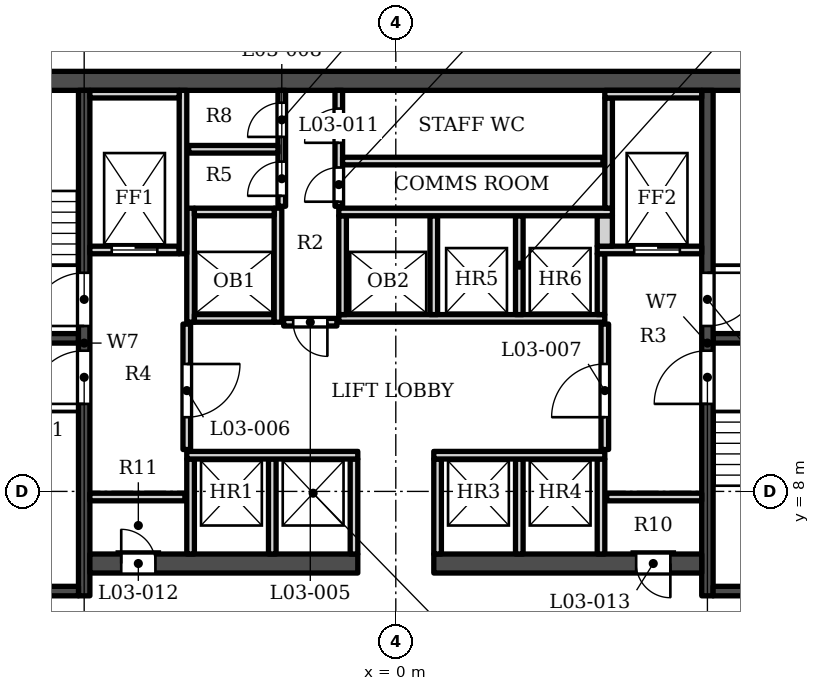
"""IFC4 building model, lengths in metres.
Left out: names, types, materials, properties, quantities, classifications, styles, units other than length and angle.
Written with IfcOpenShell. Run it as: python <this file> out.ifc"""

import sys

from ifc_helpers import new_model, si_unit, direction, frame, frame_2d, origin, place, context, subcontext, project, spatial, rectangle, extrude, element, fill, save


model = new_model("IFC4")
c1 = context("Model", 3, precision=1e-05, world=origin(), true_north=direction((0.0, 1.0)))
c2 = subcontext(c1, "Body", "Model", "MODEL_VIEW")
j1 = project(units=[si_unit("LENGTHUNIT", "METRE"), si_unit("PLANEANGLEUNIT", "RADIAN")], contexts=[c1])
p1 = place(None, origin())
s1 = spatial("IfcSite", under=j1, at=p1, CompositionType="ELEMENT")
p2 = place(p1, origin())
s2 = spatial("IfcBuilding", under=s1, at=p2, CompositionType="ELEMENT")
p3 = place(p2, frame((0.0, 0.0, 29.0)))
s3 = spatial("IfcBuildingStorey", under=s2, at=p3, CompositionType="ELEMENT", Elevation=29.0)
p4 = place(p3, frame((-16.9, 18.802, 0.0), z_axis=(0.0, 0.0, 1.0), x_axis=(1.0, 0.0, 0.0)))
e1 = element("IfcWall", 1, at=p4, inside=s3, PredefinedType="SHEAR", context=c2, shape_type="SweptSolid", body=[
    extrude(rectangle(XDim=33.8, YDim=0.5, at=frame_2d((16.9, 0.0))), origin(), (0.0, 0.0, 1.0), 5.5),
])
p5 = place(p3, frame((-8.2, 5.253, 0.0), z_axis=(0.0, 0.0, 1.0), x_axis=(0.0, 1.0, 0.0)))
e2 = element("IfcWall", 2, at=p5, inside=s3, PredefinedType="SHEAR", context=c2, shape_type="SweptSolid", body=[
    extrude(rectangle(XDim=13.3, YDim=0.3, at=frame_2d((6.65, 0.0))), origin(), (0.0, 0.0, 1.0), 5.5),
])
p6 = place(p5, frame((7.1, 0.0, 0.0)))
e3 = element("IfcOpeningElement", 3, at=p6, cuts=e2, PredefinedType="OPENING", context=c2, shape_type="SweptSolid", body=[
    extrude(rectangle(XDim=1.4, YDim=2.1, at=frame_2d((0.7, 1.05))), frame((0.0, 0.16, 0.0), z_axis=(0.0, -1.0, 0.0), x_axis=(1.0, 0.0, 0.0)), (0.0, 0.0, 1.0), 0.32),
])
p7 = place(p5, frame((5.05, 0.0, 0.0)))
e4 = element("IfcOpeningElement", 4, at=p7, cuts=e2, PredefinedType="OPENING", context=c2, shape_type="SweptSolid", body=[
    extrude(rectangle(XDim=1.4, YDim=2.1, at=frame_2d((0.7, 1.05))), frame((0.0, 0.16, 0.0), z_axis=(0.0, -1.0, 0.0), x_axis=(1.0, 0.0, 0.0)), (0.0, 0.0, 1.0), 0.32),
])
for number, where, z_axis, x_axis in (
    (5, (-12.1, 12.028, 0.0), (0.0, 0.0, 1.0), (1.0, 0.0, 0.0)),
    (6, (-12.1, 5.378, 0.0), (0.0, 0.0, 1.0), (1.0, 0.0, 0.0)),
):
    element("IfcWall", number, at=place(p3, frame(where, z_axis=z_axis, x_axis=x_axis)), inside=s3, PredefinedType="SHEAR", context=c2, shape_type="SweptSolid", body=[
        extrude(rectangle(XDim=3.75, YDim=0.25, at=frame_2d((1.875, 0.0))), origin(), (0.0, 0.0, 1.0), 5.5),
    ])
p8 = place(p3, frame((8.2, 5.253, 0.0), z_axis=(0.0, 0.0, 1.0), x_axis=(0.0, 1.0, 0.0)))
e7 = element("IfcWall", 7, at=p8, inside=s3, PredefinedType="SHEAR", context=c2, shape_type="SweptSolid", body=[
    extrude(rectangle(XDim=13.3, YDim=0.3, at=frame_2d((6.65, 0.0))), origin(), (0.0, 0.0, 1.0), 5.5),
])
p9 = place(p8, frame((7.1, 0.0, 0.0)))
e8 = element("IfcOpeningElement", 8, at=p9, cuts=e7, PredefinedType="OPENING", context=c2, shape_type="SweptSolid", body=[
    extrude(rectangle(XDim=1.4, YDim=2.1, at=frame_2d((0.7, 1.05))), frame((0.0, 0.16, 0.0), z_axis=(0.0, -1.0, 0.0), x_axis=(1.0, 0.0, 0.0)), (0.0, 0.0, 1.0), 0.32),
])
p10 = place(p8, frame((5.05, 0.0, 0.0)))
e9 = element("IfcOpeningElement", 9, at=p10, cuts=e7, PredefinedType="OPENING", context=c2, shape_type="SweptSolid", body=[
    extrude(rectangle(XDim=1.4, YDim=2.1, at=frame_2d((0.7, 1.05))), frame((0.0, 0.16, 0.0), z_axis=(0.0, -1.0, 0.0), x_axis=(1.0, 0.0, 0.0)), (0.0, 0.0, 1.0), 0.32),
])
for number, where, z_axis, x_axis in (
    (10, (8.35, 12.028, 0.0), (0.0, 0.0, 1.0), (1.0, 0.0, 0.0)),
    (11, (8.35, 5.378, 0.0), (0.0, 0.0, 1.0), (1.0, 0.0, 0.0)),
):
    element("IfcWall", number, at=place(p3, frame(where, z_axis=z_axis, x_axis=x_axis)), inside=s3, PredefinedType="SHEAR", context=c2, shape_type="SweptSolid", body=[
        extrude(rectangle(XDim=3.75, YDim=0.25, at=frame_2d((1.875, 0.0))), origin(), (0.0, 0.0, 1.0), 5.5),
    ])
p11 = place(p3, frame((-8.05, 6.103, 0.0), z_axis=(0.0, 0.0, 1.0), x_axis=(1.0, 0.0, 0.0)))
e12 = element("IfcWall", 12, at=p11, inside=s3, PredefinedType="SHEAR", context=c2, shape_type="SweptSolid", body=[
    extrude(rectangle(XDim=7.05, YDim=0.5, at=frame_2d((3.525, 0.0))), origin(), (0.0, 0.0, 1.0), 5.5),
])
p12 = place(p11, frame((0.825, 0.0, 0.0)))
e13 = element("IfcOpeningElement", 13, at=p12, cuts=e12, PredefinedType="OPENING", context=c2, shape_type="SweptSolid", body=[
    extrude(rectangle(XDim=0.9, YDim=2.1, at=frame_2d((0.45, 1.05))), frame((0.0, 0.26, 0.0), z_axis=(0.0, -1.0, 0.0), x_axis=(1.0, 0.0, 0.0)), (0.0, 0.0, 1.0), 0.52),
])
p13 = place(p3, frame((1.0, 6.103, 0.0), z_axis=(0.0, 0.0, 1.0), x_axis=(1.0, 0.0, 0.0)))
e14 = element("IfcWall", 14, at=p13, inside=s3, PredefinedType="SHEAR", context=c2, shape_type="SweptSolid", body=[
    extrude(rectangle(XDim=7.05, YDim=0.5, at=frame_2d((3.525, 0.0))), origin(), (0.0, 0.0, 1.0), 5.5),
])
p14 = place(p13, frame((5.325, 0.0, 0.0)))
e15 = element("IfcOpeningElement", 15, at=p14, cuts=e14, PredefinedType="OPENING", context=c2, shape_type="SweptSolid", body=[
    extrude(rectangle(XDim=0.9, YDim=2.1, at=frame_2d((0.45, 1.05))), frame((0.0, 0.26, 0.0), z_axis=(0.0, -1.0, 0.0), x_axis=(1.0, 0.0, 0.0)), (0.0, 0.0, 1.0), 0.52),
])
for number, where, z_axis, x_axis in (
    (16, (-5.4, 6.353, 0.0), (0.0, 0.0, 1.0), (0.0, 1.0, 0.0)),
    (17, (-3.25, 6.353, 0.0), (0.0, 0.0, 1.0), (0.0, 1.0, 0.0)),
    (18, (-1.1, 6.353, 0.0), (0.0, 0.0, 1.0), (0.0, 1.0, 0.0)),
    (19, (1.1, 6.353, 0.0), (0.0, 0.0, 1.0), (0.0, 1.0, 0.0)),
    (20, (3.25, 6.353, 0.0), (0.0, 0.0, 1.0), (0.0, 1.0, 0.0)),
    (21, (5.4, 6.353, 0.0), (0.0, 0.0, 1.0), (0.0, 1.0, 0.0)),
    (22, (-8.05, 7.853, 0.0), (0.0, 0.0, 1.0), (1.0, 0.0, 0.0)),
    (23, (5.55, 7.853, 0.0), (0.0, 0.0, 1.0), (1.0, 0.0, 0.0)),
):
    element("IfcWall", number, at=place(p3, frame(where, z_axis=z_axis, x_axis=x_axis)), inside=s3, PredefinedType="SOLIDWALL", context=c2, shape_type="SweptSolid", body=[
        extrude(rectangle(XDim=2.5, YDim=0.2, at=frame_2d((1.25, 0.0))), origin(), (0.0, 0.0, 1.0), 5.05),
    ])
for number, where, z_axis, x_axis in (
    (24, (-5.5, 8.953, 0.0), (0.0, 0.0, 1.0), (1.0, 0.0, 0.0)),
    (25, (1.0, 8.953, 0.0), (0.0, 0.0, 1.0), (1.0, 0.0, 0.0)),
):
    element("IfcWall", number, at=place(p3, frame(where, z_axis=z_axis, x_axis=x_axis)), inside=s3, PredefinedType="SOLIDWALL", context=c2, shape_type="SweptSolid", body=[
        extrude(rectangle(XDim=4.5, YDim=0.2, at=frame_2d((2.25, 0.0))), origin(), (0.0, 0.0, 1.0), 5.05),
    ])
p15 = place(p3, frame((-5.5, 9.103, 0.0), z_axis=(0.0, 0.0, 1.0), x_axis=(0.0, 1.0, 0.0)))
e26 = element("IfcWall", 26, at=p15, inside=s3, PredefinedType="SOLIDWALL", context=c2, shape_type="SweptSolid", body=[
    extrude(rectangle(XDim=3.3, YDim=0.2, at=frame_2d((1.65, 0.0))), origin(), (0.0, 0.0, 1.0), 5.05),
])
p16 = place(p15, frame((0.85, 0.0, 0.0)))
e27 = element("IfcOpeningElement", 27, at=p16, cuts=e26, PredefinedType="OPENING", context=c2, shape_type="SweptSolid", body=[
    extrude(rectangle(XDim=1.4, YDim=2.1, at=frame_2d((0.7, 1.05))), frame((0.0, 0.11, 0.0), z_axis=(0.0, -1.0, 0.0), x_axis=(1.0, 0.0, 0.0)), (0.0, 0.0, 1.0), 0.22),
])
p17 = place(p3, frame((5.5, 9.103, 0.0), z_axis=(0.0, 0.0, 1.0), x_axis=(0.0, 1.0, 0.0)))
e28 = element("IfcWall", 28, at=p17, inside=s3, PredefinedType="SOLIDWALL", context=c2, shape_type="SweptSolid", body=[
    extrude(rectangle(XDim=3.3, YDim=0.2, at=frame_2d((1.65, 0.0))), origin(), (0.0, 0.0, 1.0), 5.05),
])
p18 = place(p17, frame((0.85, 0.0, 0.0)))
e29 = element("IfcOpeningElement", 29, at=p18, cuts=e28, PredefinedType="OPENING", context=c2, shape_type="SweptSolid", body=[
    extrude(rectangle(XDim=1.4, YDim=2.1, at=frame_2d((0.7, 1.05))), frame((0.0, 0.11, 0.0), z_axis=(0.0, -1.0, 0.0), x_axis=(1.0, 0.0, 0.0)), (0.0, 0.0, 1.0), 0.22),
])
p19 = place(p3, frame((-2.95, 12.453, 0.0), z_axis=(0.0, 0.0, 1.0), x_axis=(1.0, 0.0, 0.0)))
e30 = element("IfcWall", 30, at=p19, inside=s3, PredefinedType="SOLIDWALL", context=c2, shape_type="SweptSolid", body=[
    extrude(rectangle(XDim=1.4, YDim=0.2, at=frame_2d((0.7, 0.0))), origin(), (0.0, 0.0, 1.0), 5.05),
])
p20 = place(p19, frame((0.25, 0.0, 0.0)))
e31 = element("IfcOpeningElement", 31, at=p20, cuts=e30, PredefinedType="OPENING", context=c2, shape_type="SweptSolid", body=[
    extrude(rectangle(XDim=0.9, YDim=2.1, at=frame_2d((0.45, 1.05))), frame((0.0, 0.11, 0.0), z_axis=(0.0, -1.0, 0.0), x_axis=(1.0, 0.0, 0.0)), (0.0, 0.0, 1.0), 0.22),
])
p21 = place(p3, frame((-5.4, 12.453, 0.0), z_axis=(0.0, 0.0, 1.0), x_axis=(0.0, 1.0, 0.0)))
e32 = element("IfcWall", 32, at=p21, inside=s3, PredefinedType="SOLIDWALL", context=c2, shape_type="SweptSolid", body=[
    extrude(rectangle(XDim=3.0, YDim=0.2, at=frame_2d((1.5, 0.0))), origin(), (0.0, 0.0, 1.0), 5.05),
])
p22 = place(p3, frame((-5.3, 12.552, 0.0), z_axis=(0.0, 0.0, 1.0), x_axis=(1.0, 0.0, 0.0)))
e33 = element("IfcWall", 33, at=p22, inside=s3, PredefinedType="SOLIDWALL", context=c2, shape_type="SweptSolid", body=[
    extrude(rectangle(XDim=2.1, YDim=0.2, at=frame_2d((1.05, 0.0))), origin(), (0.0, 0.0, 1.0), 5.05),
])
p23 = place(p3, frame((-3.1, 12.453, 0.0), z_axis=(0.0, 0.0, 1.0), x_axis=(0.0, 1.0, 0.0)))
e34 = element("IfcWall", 34, at=p23, inside=s3, PredefinedType="SOLIDWALL", context=c2, shape_type="SweptSolid", body=[
    extrude(rectangle(XDim=3.0, YDim=0.2, at=frame_2d((1.5, 0.0))), origin(), (0.0, 0.0, 1.0), 5.05),
])
p24 = place(p3, frame((-1.5, 12.552, 0.0), z_axis=(0.0, 0.0, 1.0), x_axis=(1.0, 0.0, 0.0)))
e35 = element("IfcWall", 35, at=p24, inside=s3, PredefinedType="SOLIDWALL", context=c2, shape_type="SweptSolid", body=[
    extrude(rectangle(XDim=7.0, YDim=0.2, at=frame_2d((3.5, 0.0))), origin(), (0.0, 0.0, 1.0), 5.05),
])
for number, where, z_axis, x_axis in (
    (36, (-1.4, 12.653, 0.0), (0.0, 0.0, 1.0), (0.0, 1.0, 0.0)),
    (37, (1.0, 12.653, 0.0), (0.0, 0.0, 1.0), (0.0, 1.0, 0.0)),
    (38, (3.25, 12.653, 0.0), (0.0, 0.0, 1.0), (0.0, 1.0, 0.0)),
):
    element("IfcWall", number, at=place(p3, frame(where, z_axis=z_axis, x_axis=x_axis)), inside=s3, PredefinedType="SOLIDWALL", context=c2, shape_type="SweptSolid", body=[
        extrude(rectangle(XDim=2.6, YDim=0.2, at=frame_2d((1.3, 0.0))), origin(), (0.0, 0.0, 1.0), 5.05),
    ])
p25 = place(p3, frame((5.4, 12.653, 0.0), z_axis=(0.0, 0.0, 1.0), x_axis=(0.0, 1.0, 0.0)))
e39 = element("IfcWall", 39, at=p25, inside=s3, PredefinedType="SOLIDWALL", context=c2, shape_type="SweptSolid", body=[
    extrude(rectangle(XDim=1.6, YDim=0.2, at=frame_2d((0.8, 0.0))), origin(), (0.0, 0.0, 1.0), 5.05),
])
p26 = place(p3, frame((-8.05, 14.353, 0.0), z_axis=(0.0, 0.0, 1.0), x_axis=(1.0, 0.0, 0.0)))
e40 = element("IfcWall", 40, at=p26, inside=s3, PredefinedType="SOLIDWALL", context=c2, shape_type="SweptSolid", body=[
    extrude(rectangle(XDim=2.35, YDim=0.2, at=frame_2d((1.175, 0.0))), origin(), (0.0, 0.0, 1.0), 5.05),
])
p27 = place(p26, frame((0.575, 0.0, 0.0)))
e41 = element("IfcOpeningElement", 41, at=p27, cuts=e40, PredefinedType="OPENING", context=c2, shape_type="SweptSolid", body=[
    extrude(rectangle(XDim=1.2, YDim=2.1, at=frame_2d((0.6, 1.05))), frame((0.0, 0.11, 0.0), z_axis=(0.0, -1.0, 0.0), x_axis=(1.0, 0.0, 0.0)), (0.0, 0.0, 1.0), 0.22),
])
p28 = place(p3, frame((-5.6, 14.253, 0.0), z_axis=(0.0, 0.0, 1.0), x_axis=(0.0, 1.0, 0.0)))
e42 = element("IfcWall", 42, at=p28, inside=s3, PredefinedType="SOLIDWALL", context=c2, shape_type="SweptSolid", body=[
    extrude(rectangle(XDim=4.3, YDim=0.2, at=frame_2d((2.15, 0.0))), origin(), (0.0, 0.0, 1.0), 5.05),
])
p29 = place(p3, frame((5.3, 14.353, 0.0), z_axis=(0.0, 0.0, 1.0), x_axis=(1.0, 0.0, 0.0)))
e43 = element("IfcWall", 43, at=p29, inside=s3, PredefinedType="SOLIDWALL", context=c2, shape_type="SweptSolid", body=[
    extrude(rectangle(XDim=2.75, YDim=0.2, at=frame_2d((1.375, 0.0))), origin(), (0.0, 0.0, 1.0), 5.05),
])
p30 = place(p29, frame((0.975, 0.0, 0.0)))
e44 = element("IfcOpeningElement", 44, at=p30, cuts=e43, PredefinedType="OPENING", context=c2, shape_type="SweptSolid", body=[
    extrude(rectangle(XDim=1.2, YDim=2.1, at=frame_2d((0.6, 1.05))), frame((0.0, 0.11, 0.0), z_axis=(0.0, -1.0, 0.0), x_axis=(1.0, 0.0, 0.0)), (0.0, 0.0, 1.0), 0.22),
])
p31 = place(p3, frame((5.5, 14.453, 0.0), z_axis=(0.0, 0.0, 1.0), x_axis=(0.0, 1.0, 0.0)))
e45 = element("IfcWall", 45, at=p31, inside=s3, PredefinedType="SOLIDWALL", context=c2, shape_type="SweptSolid", body=[
    extrude(rectangle(XDim=0.8, YDim=0.4, at=frame_2d((0.4, 0.0))), origin(), (0.0, 0.0, 1.0), 5.05),
])
p32 = place(p3, frame((-5.3, 15.353, 0.0), z_axis=(0.0, 0.0, 1.0), x_axis=(1.0, 0.0, 0.0)))
e46 = element("IfcWall", 46, at=p32, inside=s3, PredefinedType="SOLIDWALL", context=c2, shape_type="SweptSolid", body=[
    extrude(rectangle(XDim=2.1, YDim=0.2, at=frame_2d((1.05, 0.0))), origin(), (0.0, 0.0, 1.0), 5.05),
])
p33 = place(p3, frame((-1.5, 15.353, 0.0), z_axis=(0.0, 0.0, 1.0), x_axis=(1.0, 0.0, 0.0)))
e47 = element("IfcWall", 47, at=p33, inside=s3, PredefinedType="SOLIDWALL", context=c2, shape_type="SweptSolid", body=[
    extrude(rectangle(XDim=7.2, YDim=0.2, at=frame_2d((3.6, 0.0))), origin(), (0.0, 0.0, 1.0), 5.05),
])
p34 = place(p3, frame((5.6, 15.453, 0.0), z_axis=(0.0, 0.0, 1.0), x_axis=(0.0, 1.0, 0.0)))
e48 = element("IfcWall", 48, at=p34, inside=s3, PredefinedType="SOLIDWALL", context=c2, shape_type="SweptSolid", body=[
    extrude(rectangle(XDim=2.9, YDim=0.2, at=frame_2d((1.45, 0.0))), origin(), (0.0, 0.0, 1.0), 5.05),
])
p35 = place(p3, frame((-3.0, 15.503, 0.0), z_axis=(0.0, 0.0, 1.0), x_axis=(0.0, 1.0, 0.0)))
e49 = element("IfcWall", 49, at=p35, inside=s3, PredefinedType="SOLIDWALL", context=c2, shape_type="SweptSolid", body=[
    extrude(rectangle(XDim=3.05, YDim=0.2, at=frame_2d((1.525, 0.0))), origin(), (0.0, 0.0, 1.0), 5.05),
])
p36 = place(p35, frame((0.275, 0.0, 0.0)))
e50 = element("IfcOpeningElement", 50, at=p36, cuts=e49, PredefinedType="OPENING", context=c2, shape_type="SweptSolid", body=[
    extrude(rectangle(XDim=0.9, YDim=2.1, at=frame_2d((0.45, 1.05))), frame((0.0, 0.11, 0.0), z_axis=(0.0, -1.0, 0.0), x_axis=(1.0, 0.0, 0.0)), (0.0, 0.0, 1.0), 0.22),
])
p37 = place(p35, frame((1.825, 0.0, 0.0)))
e51 = element("IfcOpeningElement", 51, at=p37, cuts=e49, PredefinedType="OPENING", context=c2, shape_type="SweptSolid", body=[
    extrude(rectangle(XDim=0.9, YDim=2.1, at=frame_2d((0.45, 1.05))), frame((0.0, 0.11, 0.0), z_axis=(0.0, -1.0, 0.0), x_axis=(1.0, 0.0, 0.0)), (0.0, 0.0, 1.0), 0.22),
])
p38 = place(p3, frame((-1.5, 15.503, 0.0), z_axis=(0.0, 0.0, 1.0), x_axis=(0.0, 1.0, 0.0)))
e52 = element("IfcWall", 52, at=p38, inside=s3, PredefinedType="SOLIDWALL", context=c2, shape_type="SweptSolid", body=[
    extrude(rectangle(XDim=3.05, YDim=0.2, at=frame_2d((1.525, 0.0))), origin(), (0.0, 0.0, 1.0), 5.05),
])
p39 = place(p38, frame((0.12, 0.0, 0.0)))
e53 = element("IfcOpeningElement", 53, at=p39, cuts=e52, PredefinedType="OPENING", context=c2, shape_type="SweptSolid", body=[
    extrude(rectangle(XDim=0.9, YDim=2.1, at=frame_2d((0.45, 1.05))), frame((0.0, 0.11, 0.0), z_axis=(0.0, -1.0, 0.0), x_axis=(1.0, 0.0, 0.0)), (0.0, 0.0, 1.0), 0.22),
])
p40 = place(p38, frame((1.67, 0.0, 0.0)))
e54 = element("IfcOpeningElement", 54, at=p40, cuts=e52, PredefinedType="OPENING", context=c2, shape_type="SweptSolid", body=[
    extrude(rectangle(XDim=0.9, YDim=2.1, at=frame_2d((0.45, 1.05))), frame((0.0, 0.11, 0.0), z_axis=(0.0, -1.0, 0.0), x_axis=(1.0, 0.0, 0.0)), (0.0, 0.0, 1.0), 0.22),
])
p41 = place(p3, frame((-1.4, 16.693, 0.0), z_axis=(0.0, 0.0, 1.0), x_axis=(1.0, 0.0, 0.0)))
e55 = element("IfcWall", 55, at=p41, inside=s3, PredefinedType="SOLIDWALL", context=c2, shape_type="SweptSolid", body=[
    extrude(rectangle(XDim=6.85, YDim=0.2, at=frame_2d((3.425, 0.0))), origin(), (0.0, 0.0, 1.0), 5.05),
])
p42 = place(p3, frame((-5.45, 17.003, 0.0), z_axis=(0.0, 0.0, 1.0), x_axis=(1.0, 0.0, 0.0)))
e56 = element("IfcWall", 56, at=p42, inside=s3, PredefinedType="SOLIDWALL", context=c2, shape_type="SweptSolid", body=[
    extrude(rectangle(XDim=2.35, YDim=0.2, at=frame_2d((1.175, 0.0))), origin(), (0.0, 0.0, 1.0), 5.05),
])
p43 = place(p3, frame((-8.05, 18.453, 0.0), z_axis=(0.0, 0.0, 1.0), x_axis=(1.0, 0.0, 0.0)))
e57 = element("IfcWall", 57, at=p43, inside=s3, PredefinedType="SOLIDWALL", context=c2, shape_type="SweptSolid", body=[
    extrude(rectangle(XDim=2.35, YDim=0.2, at=frame_2d((1.175, 0.0))), origin(), (0.0, 0.0, 1.0), 5.05),
])
p44 = place(p3, frame((5.5, 18.453, 0.0), z_axis=(0.0, 0.0, 1.0), x_axis=(1.0, 0.0, 0.0)))
e58 = element("IfcWall", 58, at=p44, inside=s3, PredefinedType="SOLIDWALL", context=c2, shape_type="SweptSolid", body=[
    extrude(rectangle(XDim=2.55, YDim=0.2, at=frame_2d((1.275, 0.0))), origin(), (0.0, 0.0, 1.0), 5.05),
])
p45 = place(p27, origin())
e59 = element("IfcDoor", 59, at=p45, inside=s3, OperationType="DOUBLE_DOOR_SLIDING", PredefinedType="DOOR", context=c2, shape_type="SweptSolid", body=[
    extrude(rectangle(XDim=1.2, YDim=2.1, at=frame_2d((0.6, 1.05))), frame((0.0, 0.025, 0.0), z_axis=(0.0, -1.0, 0.0), x_axis=(1.0, 0.0, 0.0)), (0.0, 0.0, 1.0), 0.05),
])
fill(e41, e59)
p46 = place(p30, origin())
e60 = element("IfcDoor", 60, at=p46, inside=s3, OperationType="DOUBLE_DOOR_SLIDING", PredefinedType="DOOR", context=c2, shape_type="SweptSolid", body=[
    extrude(rectangle(XDim=1.2, YDim=2.1, at=frame_2d((0.6, 1.05))), frame((0.0, 0.025, 0.0), z_axis=(0.0, -1.0, 0.0), x_axis=(1.0, 0.0, 0.0)), (0.0, 0.0, 1.0), 0.05),
])
fill(e44, e60)
p47 = place(p6, origin())
e61 = element("IfcDoor", 61, at=p47, inside=s3, OperationType="SINGLE_SWING_LEFT", PredefinedType="DOOR", context=c2, shape_type="SweptSolid", body=[
    extrude(rectangle(XDim=1.4, YDim=2.1, at=frame_2d((0.7, 1.05))), frame((0.0, 0.025, 0.0), z_axis=(0.0, -1.0, 0.0), x_axis=(1.0, 0.0, 0.0)), (0.0, 0.0, 1.0), 0.05),
])
fill(e3, e61)
p48 = place(p7, origin())
e62 = element("IfcDoor", 62, at=p48, inside=s3, OperationType="SINGLE_SWING_LEFT", PredefinedType="DOOR", context=c2, shape_type="SweptSolid", body=[
    extrude(rectangle(XDim=1.4, YDim=2.1, at=frame_2d((0.7, 1.05))), frame((0.0, 0.025, 0.0), z_axis=(0.0, -1.0, 0.0), x_axis=(1.0, 0.0, 0.0)), (0.0, 0.0, 1.0), 0.05),
])
fill(e4, e62)
p49 = place(p9, origin())
e63 = element("IfcDoor", 63, at=p49, inside=s3, OperationType="SINGLE_SWING_RIGHT", PredefinedType="DOOR", context=c2, shape_type="SweptSolid", body=[
    extrude(rectangle(XDim=1.4, YDim=2.1, at=frame_2d((0.7, 1.05))), frame((0.0, 0.025, 0.0), z_axis=(0.0, -1.0, 0.0), x_axis=(1.0, 0.0, 0.0)), (0.0, 0.0, 1.0), 0.05),
])
fill(e8, e63)
p50 = place(p10, origin())
e64 = element("IfcDoor", 64, at=p50, inside=s3, OperationType="SINGLE_SWING_LEFT", PredefinedType="DOOR", context=c2, shape_type="SweptSolid", body=[
    extrude(rectangle(XDim=1.4, YDim=2.1, at=frame_2d((0.7, 1.05))), frame((0.0, 0.025, 0.0), z_axis=(0.0, -1.0, 0.0), x_axis=(1.0, 0.0, 0.0)), (0.0, 0.0, 1.0), 0.05),
])
fill(e9, e64)
p51 = place(p20, origin())
e65 = element("IfcDoor", 65, at=p51, inside=s3, OperationType="SINGLE_SWING_RIGHT", PredefinedType="DOOR", context=c2, shape_type="SweptSolid", body=[
    extrude(rectangle(XDim=0.9, YDim=2.1, at=frame_2d((0.45, 1.05))), frame((0.0, 0.025, 0.0), z_axis=(0.0, -1.0, 0.0), x_axis=(1.0, 0.0, 0.0)), (0.0, 0.0, 1.0), 0.05),
])
fill(e31, e65)
p52 = place(p16, origin())
e66 = element("IfcDoor", 66, at=p52, inside=s3, OperationType="SINGLE_SWING_RIGHT", PredefinedType="DOOR", context=c2, shape_type="SweptSolid", body=[
    extrude(rectangle(XDim=1.4, YDim=2.1, at=frame_2d((0.7, 1.05))), frame((0.0, 0.025, 0.0), z_axis=(0.0, -1.0, 0.0), x_axis=(1.0, 0.0, 0.0)), (0.0, 0.0, 1.0), 0.05),
])
fill(e27, e66)
p53 = place(p18, origin())
e67 = element("IfcDoor", 67, at=p53, inside=s3, OperationType="SINGLE_SWING_LEFT", PredefinedType="DOOR", context=c2, shape_type="SweptSolid", body=[
    extrude(rectangle(XDim=1.4, YDim=2.1, at=frame_2d((0.7, 1.05))), frame((0.0, 0.025, 0.0), z_axis=(0.0, -1.0, 0.0), x_axis=(1.0, 0.0, 0.0)), (0.0, 0.0, 1.0), 0.05),
])
fill(e29, e67)
p54 = place(p36, origin())
e68 = element("IfcDoor", 68, at=p54, inside=s3, OperationType="SINGLE_SWING_LEFT", PredefinedType="DOOR", context=c2, shape_type="SweptSolid", body=[
    extrude(rectangle(XDim=0.9, YDim=2.1, at=frame_2d((0.45, 1.05))), frame((0.0, 0.025, 0.0), z_axis=(0.0, -1.0, 0.0), x_axis=(1.0, 0.0, 0.0)), (0.0, 0.0, 1.0), 0.05),
])
fill(e50, e68)
p55 = place(p37, origin())
e69 = element("IfcDoor", 69, at=p55, inside=s3, OperationType="SINGLE_SWING_LEFT", PredefinedType="DOOR", context=c2, shape_type="SweptSolid", body=[
    extrude(rectangle(XDim=0.9, YDim=2.1, at=frame_2d((0.45, 1.05))), frame((0.0, 0.025, 0.0), z_axis=(0.0, -1.0, 0.0), x_axis=(1.0, 0.0, 0.0)), (0.0, 0.0, 1.0), 0.05),
])
fill(e51, e69)
p56 = place(p39, origin())
e70 = element("IfcDoor", 70, at=p56, inside=s3, OperationType="SINGLE_SWING_LEFT", PredefinedType="DOOR", context=c2, shape_type="SweptSolid", body=[
    extrude(rectangle(XDim=0.9, YDim=2.1, at=frame_2d((0.45, 1.05))), frame((0.0, 0.025, 0.0), z_axis=(0.0, -1.0, 0.0), x_axis=(1.0, 0.0, 0.0)), (0.0, 0.0, 1.0), 0.05),
])
fill(e53, e70)
p57 = place(p40, origin())
e71 = element("IfcDoor", 71, at=p57, inside=s3, OperationType="SINGLE_SWING_LEFT", PredefinedType="DOOR", context=c2, shape_type="SweptSolid", body=[
    extrude(rectangle(XDim=0.9, YDim=2.1, at=frame_2d((0.45, 1.05))), frame((0.0, 0.025, 0.0), z_axis=(0.0, -1.0, 0.0), x_axis=(1.0, 0.0, 0.0)), (0.0, 0.0, 1.0), 0.05),
])
fill(e54, e71)
p58 = place(p12, origin())
e72 = element("IfcDoor", 72, at=p58, inside=s3, OperationType="SINGLE_SWING_LEFT", PredefinedType="DOOR", context=c2, shape_type="SweptSolid", body=[
    extrude(rectangle(XDim=0.9, YDim=2.1, at=frame_2d((0.45, 1.05))), frame((0.0, 0.025, 0.0), z_axis=(0.0, -1.0, 0.0), x_axis=(1.0, 0.0, 0.0)), (0.0, 0.0, 1.0), 0.05),
])
fill(e13, e72)
p59 = place(p14, origin())
e73 = element("IfcDoor", 73, at=p59, inside=s3, OperationType="SINGLE_SWING_RIGHT", PredefinedType="DOOR", context=c2, shape_type="SweptSolid", body=[
    extrude(rectangle(XDim=0.9, YDim=2.1, at=frame_2d((0.45, 1.05))), frame((0.0, 0.025, 0.0), z_axis=(0.0, -1.0, 0.0), x_axis=(1.0, 0.0, 0.0)), (0.0, 0.0, 1.0), 0.05),
])
fill(e15, e73)
save(model, sys.argv[1])
